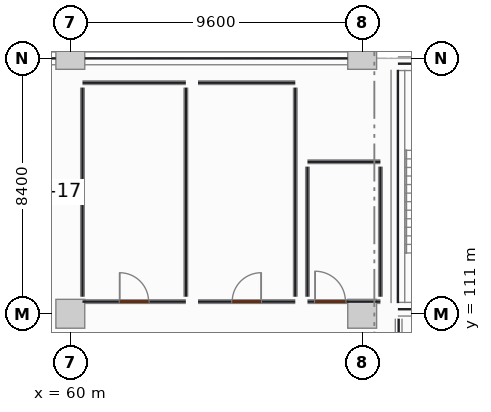
"""IFC4 building model, lengths in metres.
Left out: names, types, materials, properties, quantities, classifications, styles, units other than length and angle.
Written with IfcOpenShell. Run it as: python <this file> out.ifc"""

import sys

from ifc_helpers import new_model, si_unit, direction, frame, frame_2d, origin, origin_2d, place, context, subcontext, project, spatial, rectangle, extrude, element, fill, save


model = new_model("IFC4")
c1 = context("Model", 3, precision=1e-05, world=origin(), true_north=direction((0.0, 1.0)))
c2 = subcontext(c1, "Body", "Model", "MODEL_VIEW")
j1 = project(units=[si_unit("LENGTHUNIT", "METRE"), si_unit("PLANEANGLEUNIT", "RADIAN")], contexts=[c1])
p1 = place(None, origin())
s1 = spatial("IfcSite", under=j1, at=p1, CompositionType="ELEMENT")
p2 = place(p1, origin())
s2 = spatial("IfcBuilding", under=s1, at=p2, CompositionType="ELEMENT")
p3 = place(p2, frame((0.0, 0.0, -4.5)))
s3 = spatial("IfcBuildingStorey", under=s2, at=p3, CompositionType="ELEMENT", Elevation=-4.5)
p4 = place(p3, frame((60.0, 111.0, 0.0), z_axis=(0.0, 0.0, 1.0), x_axis=(1.0, 0.0, 0.0)))
e1 = element("IfcColumn", 1, at=p4, inside=s3, PredefinedType="COLUMN", context=c2, shape_type="SweptSolid", body=[
    extrude(rectangle(XDim=0.95, YDim=0.95, at=origin_2d()), origin(), (0.0, 0.0, 1.0), 4.14),
])
p5 = place(p3, frame((60.0, 119.4, 0.0), z_axis=(0.0, 0.0, 1.0), x_axis=(1.0, 0.0, 0.0)))
e2 = element("IfcColumn", 2, at=p5, inside=s3, PredefinedType="COLUMN", context=c2, shape_type="SweptSolid", body=[
    extrude(rectangle(XDim=0.95, YDim=0.72, at=origin_2d()), origin(), (0.0, 0.0, 1.0), 4.14),
])
p6 = place(p3, frame((69.6, 111.0, 0.0), z_axis=(0.0, 0.0, 1.0), x_axis=(1.0, 0.0, 0.0)))
e3 = element("IfcColumn", 3, at=p6, inside=s3, PredefinedType="COLUMN", context=c2, shape_type="SweptSolid", body=[
    extrude(rectangle(XDim=0.95, YDim=0.95, at=origin_2d()), origin(), (0.0, 0.0, 1.0), 4.14),
])
p7 = place(p3, frame((69.6, 119.4, 0.0), z_axis=(0.0, 0.0, 1.0), x_axis=(1.0, 0.0, 0.0)))
e4 = element("IfcColumn", 4, at=p7, inside=s3, PredefinedType="COLUMN", context=c2, shape_type="SweptSolid", body=[
    extrude(rectangle(XDim=0.95, YDim=0.72, at=origin_2d()), origin(), (0.0, 0.0, 1.0), 4.14),
])
for number, where, z_axis, x_axis in (
    (5, (50.877, 119.4, 0.0), (0.0, 0.0, 1.0), (1.0, 0.0, 0.0)),
    (6, (60.477, 119.4, 0.0), (0.0, 0.0, 1.0), (1.0, 0.0, 0.0)),
):
    element("IfcWall", number, at=place(p3, frame(where, z_axis=z_axis, x_axis=x_axis)), inside=s3, PredefinedType="SOLIDWALL", context=c2, shape_type="SweptSolid", body=[
        extrude(rectangle(XDim=8.646, YDim=0.42, at=frame_2d((4.323, 0.0))), origin(), (0.0, 0.0, 1.0), 4.135),
    ])
p8 = place(p3, frame((70.775, 111.15, 0.0), z_axis=(0.0, 0.0, 1.0), x_axis=(1.0, 0.0, 0.0)))
e7 = element("IfcWall", 7, at=p8, inside=s3, PredefinedType="SHEAR", context=c2, shape_type="SweptSolid", body=[
    extrude(rectangle(XDim=3.7, YDim=0.45, at=frame_2d((1.85, 0.0))), origin(), (0.0, 0.0, 1.0), 4.14),
])
p9 = place(p8, frame((1.1, 0.0, 0.0)))
e8 = element("IfcOpeningElement", 8, at=p9, cuts=e7, PredefinedType="OPENING", context=c2, shape_type="SweptSolid", body=[
    extrude(rectangle(XDim=1.2, YDim=2.2, at=frame_2d((0.6, 1.1))), frame((0.0, 0.235, 0.0), z_axis=(0.0, -1.0, 0.0), x_axis=(1.0, 0.0, 0.0)), (0.0, 0.0, 1.0), 0.47),
])
p10 = place(p3, frame((70.775, 111.35, 0.0), z_axis=(0.0, 0.0, 1.0), x_axis=(0.0, 1.0, 0.0)))
e9 = element("IfcWall", 9, at=p10, inside=s3, PredefinedType="SHEAR", context=c2, shape_type="SweptSolid", body=[
    extrude(rectangle(XDim=7.675, YDim=0.45, at=frame_2d((3.837, 0.0))), origin(), (0.0, 0.0, 1.0), 4.14),
])
p11 = place(p3, frame((70.775, 119.225, 0.0), z_axis=(0.0, 0.0, 1.0), x_axis=(1.0, 0.0, 0.0)))
e10 = element("IfcWall", 10, at=p11, inside=s3, PredefinedType="SHEAR", context=c2, shape_type="SweptSolid", body=[
    extrude(rectangle(XDim=3.7, YDim=0.45, at=frame_2d((1.85, 0.0))), origin(), (0.0, 0.0, 1.0), 4.14),
])
p12 = place(p3, frame((70.8, 107.76, 0.0), z_axis=(0.0, 0.0, 1.0), x_axis=(0.0, 1.0, 0.0)))
e11 = element("IfcWall", 11, at=p12, inside=s3, PredefinedType="PARTITIONING", context=c2, shape_type="SweptSolid", body=[
    extrude(rectangle(XDim=3.08, YDim=0.22, at=frame_2d((1.54, 0.0))), origin(), (0.0, 0.0, 1.0), 3.22),
])
p13 = place(p3, frame((60.4, 111.4, 0.0), z_axis=(0.0, 0.0, 1.0), x_axis=(1.0, 0.0, 0.0)))
e12 = element("IfcWall", 12, at=p13, inside=s3, PredefinedType="PARTITIONING", context=c2, shape_type="SweptSolid", body=[
    extrude(rectangle(XDim=3.4, YDim=0.12, at=frame_2d((1.7, 0.0))), origin(), (0.0, 0.0, 1.0), 3.22),
])
p14 = place(p13, frame((1.225, 0.0, 0.0)))
e13 = element("IfcOpeningElement", 13, at=p14, cuts=e12, PredefinedType="OPENING", context=c2, shape_type="SweptSolid", body=[
    extrude(rectangle(XDim=0.95, YDim=2.1, at=frame_2d((0.475, 1.05))), frame((0.0, 0.07, 0.0), z_axis=(0.0, -1.0, 0.0), x_axis=(1.0, 0.0, 0.0)), (0.0, 0.0, 1.0), 0.14),
])
p15 = place(p3, frame((60.4, 118.6, 0.0), z_axis=(0.0, 0.0, 1.0), x_axis=(1.0, 0.0, 0.0)))
e14 = element("IfcWall", 14, at=p15, inside=s3, PredefinedType="PARTITIONING", context=c2, shape_type="SweptSolid", body=[
    extrude(rectangle(XDim=3.4, YDim=0.12, at=frame_2d((1.7, 0.0))), origin(), (0.0, 0.0, 1.0), 3.22),
])
for number, where, z_axis, x_axis in (
    (15, (60.4, 111.56, 0.0), (0.0, 0.0, 1.0), (0.0, 1.0, 0.0)),
    (16, (63.8, 111.56, 0.0), (0.0, 0.0, 1.0), (0.0, 1.0, 0.0)),
):
    element("IfcWall", number, at=place(p3, frame(where, z_axis=z_axis, x_axis=x_axis)), inside=s3, PredefinedType="PARTITIONING", context=c2, shape_type="SweptSolid", body=[
        extrude(rectangle(XDim=6.88, YDim=0.12, at=frame_2d((3.44, 0.0))), origin(), (0.0, 0.0, 1.0), 3.22),
    ])
p16 = place(p3, frame((64.2, 111.4, 0.0), z_axis=(0.0, 0.0, 1.0), x_axis=(1.0, 0.0, 0.0)))
e17 = element("IfcWall", 17, at=p16, inside=s3, PredefinedType="PARTITIONING", context=c2, shape_type="SweptSolid", body=[
    extrude(rectangle(XDim=3.2, YDim=0.12, at=frame_2d((1.6, 0.0))), origin(), (0.0, 0.0, 1.0), 3.22),
])
p17 = place(p16, frame((1.125, 0.0, 0.0)))
e18 = element("IfcOpeningElement", 18, at=p17, cuts=e17, PredefinedType="OPENING", context=c2, shape_type="SweptSolid", body=[
    extrude(rectangle(XDim=0.95, YDim=2.1, at=frame_2d((0.475, 1.05))), frame((0.0, 0.07, 0.0), z_axis=(0.0, -1.0, 0.0), x_axis=(1.0, 0.0, 0.0)), (0.0, 0.0, 1.0), 0.14),
])
p18 = place(p3, frame((64.2, 118.6, 0.0), z_axis=(0.0, 0.0, 1.0), x_axis=(1.0, 0.0, 0.0)))
e19 = element("IfcWall", 19, at=p18, inside=s3, PredefinedType="PARTITIONING", context=c2, shape_type="SweptSolid", body=[
    extrude(rectangle(XDim=3.2, YDim=0.12, at=frame_2d((1.6, 0.0))), origin(), (0.0, 0.0, 1.0), 3.22),
])
p19 = place(p3, frame((67.4, 111.56, 0.0), z_axis=(0.0, 0.0, 1.0), x_axis=(0.0, 1.0, 0.0)))
e20 = element("IfcWall", 20, at=p19, inside=s3, PredefinedType="PARTITIONING", context=c2, shape_type="SweptSolid", body=[
    extrude(rectangle(XDim=6.88, YDim=0.12, at=frame_2d((3.44, 0.0))), origin(), (0.0, 0.0, 1.0), 3.22),
])
p20 = place(p3, frame((67.8, 111.4, 0.0), z_axis=(0.0, 0.0, 1.0), x_axis=(1.0, 0.0, 0.0)))
e21 = element("IfcWall", 21, at=p20, inside=s3, PredefinedType="PARTITIONING", context=c2, shape_type="SweptSolid", body=[
    extrude(rectangle(XDim=2.4, YDim=0.12, at=frame_2d((1.2, 0.0))), origin(), (0.0, 0.0, 1.0), 3.22),
])
p21 = place(p20, frame((0.25, 0.0, 0.0)))
e22 = element("IfcOpeningElement", 22, at=p21, cuts=e21, PredefinedType="OPENING", context=c2, shape_type="SweptSolid", body=[
    extrude(rectangle(XDim=1.0, YDim=2.15, at=frame_2d((0.5, 1.075))), frame((0.0, 0.07, 0.0), z_axis=(0.0, -1.0, 0.0), x_axis=(1.0, 0.0, 0.0)), (0.0, 0.0, 1.0), 0.14),
])
p22 = place(p3, frame((67.8, 116.0, 0.0), z_axis=(0.0, 0.0, 1.0), x_axis=(1.0, 0.0, 0.0)))
e23 = element("IfcWall", 23, at=p22, inside=s3, PredefinedType="PARTITIONING", context=c2, shape_type="SweptSolid", body=[
    extrude(rectangle(XDim=2.4, YDim=0.12, at=frame_2d((1.2, 0.0))), origin(), (0.0, 0.0, 1.0), 3.22),
])
for number, where, z_axis, x_axis in (
    (24, (67.8, 111.56, 0.0), (0.0, 0.0, 1.0), (0.0, 1.0, 0.0)),
    (25, (70.2, 111.56, 0.0), (0.0, 0.0, 1.0), (0.0, 1.0, 0.0)),
):
    element("IfcWall", number, at=place(p3, frame(where, z_axis=z_axis, x_axis=x_axis)), inside=s3, PredefinedType="PARTITIONING", context=c2, shape_type="SweptSolid", body=[
        extrude(rectangle(XDim=4.28, YDim=0.12, at=frame_2d((2.14, 0.0))), origin(), (0.0, 0.0, 1.0), 3.22),
    ])
p23 = place(p14, origin())
e26 = element("IfcDoor", 26, at=p23, inside=s3, OperationType="SINGLE_SWING_LEFT", PredefinedType="DOOR", context=c2, shape_type="SweptSolid", body=[
    extrude(rectangle(XDim=0.95, YDim=2.1, at=frame_2d((0.475, 1.05))), frame((0.0, 0.025, 0.0), z_axis=(0.0, -1.0, 0.0), x_axis=(1.0, 0.0, 0.0)), (0.0, 0.0, 1.0), 0.05),
])
fill(e13, e26)
p24 = place(p17, origin())
e27 = element("IfcDoor", 27, at=p24, inside=s3, OperationType="SINGLE_SWING_RIGHT", PredefinedType="DOOR", context=c2, shape_type="SweptSolid", body=[
    extrude(rectangle(XDim=0.95, YDim=2.1, at=frame_2d((0.475, 1.05))), frame((0.0, 0.025, 0.0), z_axis=(0.0, -1.0, 0.0), x_axis=(1.0, 0.0, 0.0)), (0.0, 0.0, 1.0), 0.05),
])
fill(e18, e27)
p25 = place(p21, origin())
e28 = element("IfcDoor", 28, at=p25, inside=s3, OperationType="SINGLE_SWING_LEFT", PredefinedType="DOOR", context=c2, shape_type="SweptSolid", body=[
    extrude(rectangle(XDim=1.0, YDim=2.15, at=frame_2d((0.5, 1.075))), frame((0.0, 0.025, 0.0), z_axis=(0.0, -1.0, 0.0), x_axis=(1.0, 0.0, 0.0)), (0.0, 0.0, 1.0), 0.05),
])
fill(e22, e28)
save(model, sys.argv[1])
